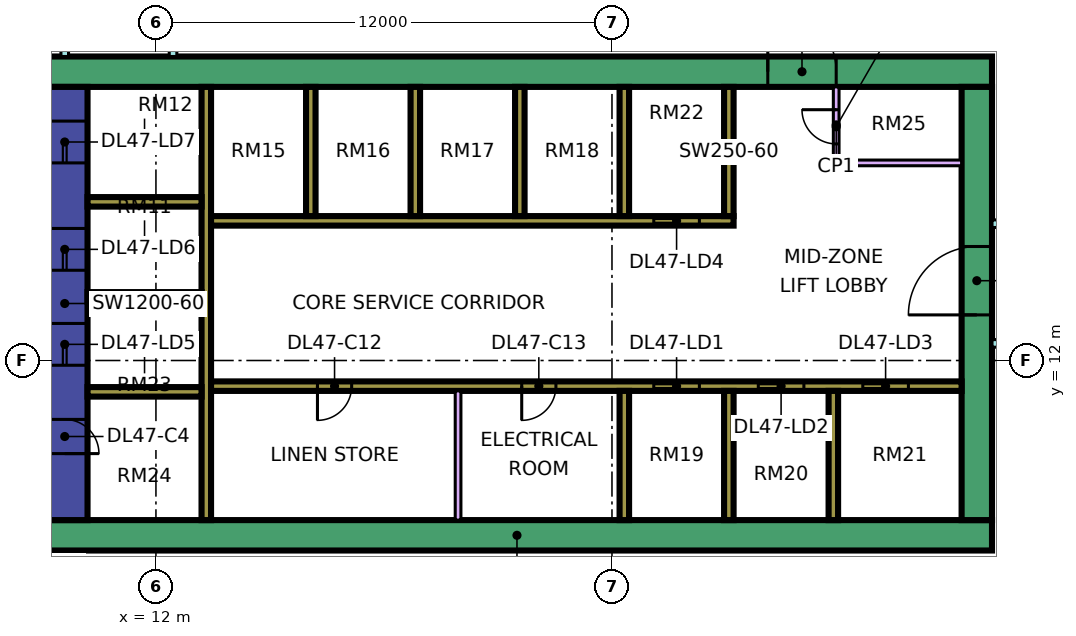
"""IFC4 building model, lengths in metres.
Left out: names, types, materials, properties, quantities, classifications, styles, units other than length and angle.
Written with IfcOpenShell. Run it as: python <this file> out.ifc"""

import sys

from ifc_helpers import new_model, si_unit, direction, frame, frame_2d, origin, place, context, subcontext, project, spatial, rectangle, extrude, element, fill, save


model = new_model("IFC4")
c1 = context("Model", 3, precision=1e-05, world=origin(), true_north=direction((0.0, 1.0)))
c2 = subcontext(c1, "Body", "Model", "MODEL_VIEW")
j1 = project(units=[si_unit("LENGTHUNIT", "METRE"), si_unit("PLANEANGLEUNIT", "RADIAN")], contexts=[c1])
p1 = place(None, origin())
s1 = spatial("IfcSite", under=j1, at=p1, CompositionType="ELEMENT")
p2 = place(p1, origin())
s2 = spatial("IfcBuilding", under=s1, at=p2, CompositionType="ELEMENT")
p3 = place(p2, frame((0.0, 0.0, 202.4)))
s3 = spatial("IfcBuildingStorey", under=s2, at=p3, CompositionType="ELEMENT", Elevation=202.4)
p4 = place(p3, frame((9.0, 7.4, 0.0), z_axis=(0.0, 0.0, 1.0), x_axis=(1.0, 0.0, 0.0)))
e1 = element("IfcWall", 1, at=p4, inside=s3, PredefinedType="SHEAR", context=c2, shape_type="SweptSolid", body=[
    extrude(rectangle(XDim=25.0, YDim=0.8, at=frame_2d((12.5, 0.0))), origin(), (0.0, 0.0, 1.0), 3.75),
])
p5 = place(p3, frame((9.0, 19.6, 0.0), z_axis=(0.0, 0.0, 1.0), x_axis=(1.0, 0.0, 0.0)))
e2 = element("IfcWall", 2, at=p5, inside=s3, PredefinedType="SHEAR", context=c2, shape_type="SweptSolid", body=[
    extrude(rectangle(XDim=25.0, YDim=0.8, at=frame_2d((12.5, 0.0))), origin(), (0.0, 0.0, 1.0), 3.75),
])
p6 = place(p5, frame((19.1, 0.0, 0.0)))
e3 = element("IfcOpeningElement", 3, at=p6, cuts=e2, PredefinedType="OPENING", context=c2, shape_type="SweptSolid", body=[
    extrude(rectangle(XDim=1.8, YDim=2.4, at=frame_2d((0.9, 1.2))), frame((0.0, 0.41, 0.0), z_axis=(0.0, -1.0, 0.0), x_axis=(1.0, 0.0, 0.0)), (0.0, 0.0, 1.0), 0.82),
])
p7 = place(p3, frame((9.6, 7.8, 0.0), z_axis=(0.0, 0.0, 1.0), x_axis=(0.0, 1.0, 0.0)))
e4 = element("IfcWall", 4, at=p7, inside=s3, PredefinedType="SHEAR", context=c2, shape_type="SweptSolid", body=[
    extrude(rectangle(XDim=11.4, YDim=1.2, at=frame_2d((5.7, 0.0))), origin(), (0.0, 0.0, 1.0), 3.75),
])
p8 = place(p7, frame((4.075, 0.0, 0.0)))
e5 = element("IfcOpeningElement", 5, at=p8, cuts=e4, PredefinedType="OPENING", context=c2, shape_type="SweptSolid", body=[
    extrude(rectangle(XDim=1.1, YDim=2.2, at=frame_2d((0.55, 1.1))), frame((0.0, 0.61, 0.0), z_axis=(0.0, -1.0, 0.0), x_axis=(1.0, 0.0, 0.0)), (0.0, 0.0, 1.0), 1.22),
])
p9 = place(p7, frame((6.575, 0.0, 0.0)))
e6 = element("IfcOpeningElement", 6, at=p9, cuts=e4, PredefinedType="OPENING", context=c2, shape_type="SweptSolid", body=[
    extrude(rectangle(XDim=1.1, YDim=2.2, at=frame_2d((0.55, 1.1))), frame((0.0, 0.61, 0.0), z_axis=(0.0, -1.0, 0.0), x_axis=(1.0, 0.0, 0.0)), (0.0, 0.0, 1.0), 1.22),
])
p10 = place(p7, frame((9.4, 0.0, 0.0)))
e7 = element("IfcOpeningElement", 7, at=p10, cuts=e4, PredefinedType="OPENING", context=c2, shape_type="SweptSolid", body=[
    extrude(rectangle(XDim=1.1, YDim=2.2, at=frame_2d((0.55, 1.1))), frame((0.0, 0.61, 0.0), z_axis=(0.0, -1.0, 0.0), x_axis=(1.0, 0.0, 0.0)), (0.0, 0.0, 1.0), 1.22),
])
p11 = place(p7, frame((1.75, 0.0, 0.0)))
e8 = element("IfcOpeningElement", 8, at=p11, cuts=e4, PredefinedType="OPENING", context=c2, shape_type="SweptSolid", body=[
    extrude(rectangle(XDim=0.9, YDim=2.1, at=frame_2d((0.45, 1.05))), frame((0.0, 0.61, 0.0), z_axis=(0.0, -1.0, 0.0), x_axis=(1.0, 0.0, 0.0)), (0.0, 0.0, 1.0), 1.22),
])
p12 = place(p3, frame((33.6, 7.8, 0.0), z_axis=(0.0, 0.0, 1.0), x_axis=(0.0, 1.0, 0.0)))
e9 = element("IfcWall", 9, at=p12, inside=s3, PredefinedType="SHEAR", context=c2, shape_type="SweptSolid", body=[
    extrude(rectangle(XDim=11.4, YDim=0.8, at=frame_2d((5.7, 0.0))), origin(), (0.0, 0.0, 1.0), 3.75),
])
p13 = place(p12, frame((5.4, 0.0, 0.0)))
e10 = element("IfcOpeningElement", 10, at=p13, cuts=e9, PredefinedType="OPENING", context=c2, shape_type="SweptSolid", body=[
    extrude(rectangle(XDim=1.8, YDim=2.4, at=frame_2d((0.9, 1.2))), frame((0.0, 0.41, 0.0), z_axis=(0.0, -1.0, 0.0), x_axis=(1.0, 0.0, 0.0)), (0.0, 0.0, 1.0), 0.82),
])
p14 = place(p3, frame((13.325, 7.8, 0.0), z_axis=(0.0, 0.0, 1.0), x_axis=(0.0, 1.0, 0.0)))
e11 = element("IfcWall", 11, at=p14, inside=s3, PredefinedType="SHEAR", context=c2, shape_type="SweptSolid", body=[
    extrude(rectangle(XDim=11.4, YDim=0.25, at=frame_2d((5.7, 0.0))), origin(), (0.0, 0.0, 1.0), 3.75),
])
p15 = place(p3, frame((13.45, 11.325, 0.0), z_axis=(0.0, 0.0, 1.0), x_axis=(1.0, 0.0, 0.0)))
e12 = element("IfcWall", 12, at=p15, inside=s3, PredefinedType="SHEAR", context=c2, shape_type="SweptSolid", body=[
    extrude(rectangle(XDim=19.75, YDim=0.25, at=frame_2d((9.875, 0.0))), origin(), (0.0, 0.0, 1.0), 3.75),
])
p16 = place(p15, frame((11.65, 0.0, 0.0)))
e13 = element("IfcOpeningElement", 13, at=p16, cuts=e12, PredefinedType="OPENING", context=c2, shape_type="SweptSolid", body=[
    extrude(rectangle(XDim=1.2, YDim=2.2, at=frame_2d((0.6, 1.1))), frame((0.0, 0.135, 0.0), z_axis=(0.0, -1.0, 0.0), x_axis=(1.0, 0.0, 0.0)), (0.0, 0.0, 1.0), 0.27),
])
p17 = place(p15, frame((14.4, 0.0, 0.0)))
e14 = element("IfcOpeningElement", 14, at=p17, cuts=e12, PredefinedType="OPENING", context=c2, shape_type="SweptSolid", body=[
    extrude(rectangle(XDim=1.2, YDim=2.2, at=frame_2d((0.6, 1.1))), frame((0.0, 0.135, 0.0), z_axis=(0.0, -1.0, 0.0), x_axis=(1.0, 0.0, 0.0)), (0.0, 0.0, 1.0), 0.27),
])
p18 = place(p15, frame((17.15, 0.0, 0.0)))
e15 = element("IfcOpeningElement", 15, at=p18, cuts=e12, PredefinedType="OPENING", context=c2, shape_type="SweptSolid", body=[
    extrude(rectangle(XDim=1.2, YDim=2.2, at=frame_2d((0.6, 1.1))), frame((0.0, 0.135, 0.0), z_axis=(0.0, -1.0, 0.0), x_axis=(1.0, 0.0, 0.0)), (0.0, 0.0, 1.0), 0.27),
])
p19 = place(p15, frame((2.8, 0.0, 0.0)))
e16 = element("IfcOpeningElement", 16, at=p19, cuts=e12, PredefinedType="OPENING", context=c2, shape_type="SweptSolid", body=[
    extrude(rectangle(XDim=0.9, YDim=2.1, at=frame_2d((0.45, 1.05))), frame((0.0, 0.135, 0.0), z_axis=(0.0, -1.0, 0.0), x_axis=(1.0, 0.0, 0.0)), (0.0, 0.0, 1.0), 0.27),
])
p20 = place(p15, frame((8.175, 0.0, 0.0)))
e17 = element("IfcOpeningElement", 17, at=p20, cuts=e12, PredefinedType="OPENING", context=c2, shape_type="SweptSolid", body=[
    extrude(rectangle(XDim=0.9, YDim=2.1, at=frame_2d((0.45, 1.05))), frame((0.0, 0.135, 0.0), z_axis=(0.0, -1.0, 0.0), x_axis=(1.0, 0.0, 0.0)), (0.0, 0.0, 1.0), 0.27),
])
p21 = place(p3, frame((13.45, 15.675, 0.0), z_axis=(0.0, 0.0, 1.0), x_axis=(1.0, 0.0, 0.0)))
e18 = element("IfcWall", 18, at=p21, inside=s3, PredefinedType="SHEAR", context=c2, shape_type="SweptSolid", body=[
    extrude(rectangle(XDim=13.75, YDim=0.25, at=frame_2d((6.875, 0.0))), origin(), (0.0, 0.0, 1.0), 3.75),
])
p22 = place(p21, frame((11.65, 0.0, 0.0)))
e19 = element("IfcOpeningElement", 19, at=p22, cuts=e18, PredefinedType="OPENING", context=c2, shape_type="SweptSolid", body=[
    extrude(rectangle(XDim=1.2, YDim=2.2, at=frame_2d((0.6, 1.1))), frame((0.0, 0.135, 0.0), z_axis=(0.0, -1.0, 0.0), x_axis=(1.0, 0.0, 0.0)), (0.0, 0.0, 1.0), 0.27),
])
for number, where, z_axis, x_axis in (
    (20, (10.2, 11.175, 0.0), (0.0, 0.0, 1.0), (1.0, 0.0, 0.0)),
    (21, (10.2, 13.675, 0.0), (0.0, 0.0, 1.0), (1.0, 0.0, 0.0)),
    (22, (10.2, 16.175, 0.0), (0.0, 0.0, 1.0), (1.0, 0.0, 0.0)),
):
    element("IfcWall", number, at=place(p3, frame(where, z_axis=z_axis, x_axis=x_axis)), inside=s3, PredefinedType="SHEAR", context=c2, shape_type="SweptSolid", body=[
        extrude(rectangle(XDim=3.0, YDim=0.25, at=frame_2d((1.5, 0.0))), origin(), (0.0, 0.0, 1.0), 3.75),
    ])
for number, where, z_axis, x_axis in (
    (23, (24.325, 7.8, 0.0), (0.0, 0.0, 1.0), (0.0, 1.0, 0.0)),
    (24, (27.075, 7.8, 0.0), (0.0, 0.0, 1.0), (0.0, 1.0, 0.0)),
    (25, (29.825, 7.8, 0.0), (0.0, 0.0, 1.0), (0.0, 1.0, 0.0)),
    (26, (16.075, 15.8, 0.0), (0.0, 0.0, 1.0), (0.0, 1.0, 0.0)),
    (27, (18.825, 15.8, 0.0), (0.0, 0.0, 1.0), (0.0, 1.0, 0.0)),
    (28, (21.575, 15.8, 0.0), (0.0, 0.0, 1.0), (0.0, 1.0, 0.0)),
    (29, (24.325, 15.8, 0.0), (0.0, 0.0, 1.0), (0.0, 1.0, 0.0)),
    (30, (27.075, 15.8, 0.0), (0.0, 0.0, 1.0), (0.0, 1.0, 0.0)),
):
    element("IfcWall", number, at=place(p3, frame(where, z_axis=z_axis, x_axis=x_axis)), inside=s3, PredefinedType="SHEAR", context=c2, shape_type="SweptSolid", body=[
        extrude(rectangle(XDim=3.4, YDim=0.25, at=frame_2d((1.7, 0.0))), origin(), (0.0, 0.0, 1.0), 3.75),
    ])
p23 = place(p3, frame((-1.447, 12.553, 0.0), z_axis=(0.0, 0.0, 1.0), x_axis=(0.707106781187, -0.707106781187, 0.0)))
e31 = element("IfcWall", 31, at=p23, inside=s3, PredefinedType="SOLIDWALL", context=c2, shape_type="SweptSolid", body=[
    extrude(rectangle(XDim=19.799, YDim=0.15, at=frame_2d((9.899, 0.0))), origin(), (0.0, 0.0, 1.0), 3.3),
])
p24 = place(p23, frame((2.212, 0.0, 0.45)))
e32 = element("IfcOpeningElement", 32, at=p24, cuts=e31, PredefinedType="OPENING", context=c2, shape_type="SweptSolid", body=[
    extrude(rectangle(XDim=3.0, YDim=2.4, at=frame_2d((1.5, 1.2))), frame((0.0, 0.085, 0.0), z_axis=(0.0, -1.0, 0.0), x_axis=(1.0, 0.0, 0.0)), (0.0, 0.0, 1.0), 0.17),
])
p25 = place(p23, frame((10.216, 0.0, 0.45)))
e33 = element("IfcOpeningElement", 33, at=p25, cuts=e31, PredefinedType="OPENING", context=c2, shape_type="SweptSolid", body=[
    extrude(rectangle(XDim=3.0, YDim=2.4, at=frame_2d((1.5, 1.2))), frame((0.0, 0.085, 0.0), z_axis=(0.0, -1.0, 0.0), x_axis=(1.0, 0.0, 0.0)), (0.0, 0.0, 1.0), 0.17),
])
p26 = place(p3, frame((19.95, 7.8, 0.0), z_axis=(0.0, 0.0, 1.0), x_axis=(0.0, 1.0, 0.0)))
e34 = element("IfcWall", 34, at=p26, inside=s3, PredefinedType="PARTITIONING", context=c2, shape_type="SweptSolid", body=[
    extrude(rectangle(XDim=3.4, YDim=0.15, at=frame_2d((1.7, 0.0))), origin(), (0.0, 0.0, 1.0), 3.3),
])
p27 = place(p3, frame((29.9, 17.2, 0.0), z_axis=(0.0, 0.0, 1.0), x_axis=(0.0, 1.0, 0.0)))
e35 = element("IfcWall", 35, at=p27, inside=s3, PredefinedType="PARTITIONING", context=c2, shape_type="SweptSolid", body=[
    extrude(rectangle(XDim=2.0, YDim=0.15, at=frame_2d((1.0, 0.0))), origin(), (0.0, 0.0, 1.0), 3.3),
])
p28 = place(p27, frame((0.5, 0.0, 0.0)))
e36 = element("IfcOpeningElement", 36, at=p28, cuts=e35, PredefinedType="OPENING", context=c2, shape_type="SweptSolid", body=[
    extrude(rectangle(XDim=0.9, YDim=2.1, at=frame_2d((0.45, 1.05))), frame((0.0, 0.085, 0.0), z_axis=(0.0, -1.0, 0.0), x_axis=(1.0, 0.0, 0.0)), (0.0, 0.0, 1.0), 0.17),
])
p29 = place(p3, frame((29.9, 17.2, 0.0), z_axis=(0.0, 0.0, 1.0), x_axis=(1.0, 0.0, 0.0)))
e37 = element("IfcWall", 37, at=p29, inside=s3, PredefinedType="PARTITIONING", context=c2, shape_type="SweptSolid", body=[
    extrude(rectangle(XDim=3.3, YDim=0.15, at=frame_2d((1.65, 0.0))), origin(), (0.0, 0.0, 1.0), 3.3),
])
p30 = place(p3, frame((9.6, 20.0, 0.0), z_axis=(0.0, 0.0, 1.0), x_axis=(0.0, 1.0, 0.0)))
e38 = element("IfcWall", 38, at=p30, inside=s3, PredefinedType="PARTITIONING", context=c2, shape_type="SweptSolid", body=[
    extrude(rectangle(XDim=44.35, YDim=0.2, at=frame_2d((22.175, 0.0))), origin(), (0.0, 0.0, 1.0), 3.3),
])
p31 = place(p30, frame((17.1, 0.0, 0.0)))
e39 = element("IfcOpeningElement", 39, at=p31, cuts=e38, PredefinedType="OPENING", context=c2, shape_type="SweptSolid", body=[
    extrude(rectangle(XDim=1.0, YDim=2.1, at=frame_2d((0.5, 1.05))), frame((0.0, 0.11, 0.0), z_axis=(0.0, -1.0, 0.0), x_axis=(1.0, 0.0, 0.0)), (0.0, 0.0, 1.0), 0.22),
])
p32 = place(p30, frame((29.1, 0.0, 0.0)))
e40 = element("IfcOpeningElement", 40, at=p32, cuts=e38, PredefinedType="OPENING", context=c2, shape_type="SweptSolid", body=[
    extrude(rectangle(XDim=1.0, YDim=2.1, at=frame_2d((0.5, 1.05))), frame((0.0, 0.11, 0.0), z_axis=(0.0, -1.0, 0.0), x_axis=(1.0, 0.0, 0.0)), (0.0, 0.0, 1.0), 0.22),
])
p33 = place(p30, frame((0.6, 0.0, 0.0)))
e41 = element("IfcOpeningElement", 41, at=p33, cuts=e38, PredefinedType="OPENING", context=c2, shape_type="SweptSolid", body=[
    extrude(rectangle(XDim=1.2, YDim=2.1, at=frame_2d((0.6, 1.05))), frame((0.0, 0.11, 0.0), z_axis=(0.0, -1.0, 0.0), x_axis=(1.0, 0.0, 0.0)), (0.0, 0.0, 1.0), 0.22),
])
p34 = place(p30, frame((4.35, 0.0, 0.0)))
e42 = element("IfcOpeningElement", 42, at=p34, cuts=e38, PredefinedType="OPENING", context=c2, shape_type="SweptSolid", body=[
    extrude(rectangle(XDim=1.0, YDim=2.1, at=frame_2d((0.5, 1.05))), frame((0.0, 0.11, 0.0), z_axis=(0.0, -1.0, 0.0), x_axis=(1.0, 0.0, 0.0)), (0.0, 0.0, 1.0), 0.22),
])
p35 = place(p3, frame((12.45, 20.0, 0.0), z_axis=(0.0, 0.0, 1.0), x_axis=(0.0, 1.0, 0.0)))
e43 = element("IfcWall", 43, at=p35, inside=s3, PredefinedType="PARTITIONING", context=c2, shape_type="SweptSolid", body=[
    extrude(rectangle(XDim=42.926, YDim=0.2, at=frame_2d((21.463, 0.0))), origin(), (0.0, 0.0, 1.0), 3.3),
])
p36 = place(p35, frame((7.15, 0.0, 0.0)))
e44 = element("IfcOpeningElement", 44, at=p36, cuts=e43, PredefinedType="OPENING", context=c2, shape_type="SweptSolid", body=[
    extrude(rectangle(XDim=1.6, YDim=2.1, at=frame_2d((0.8, 1.05))), frame((0.0, 0.11, 0.0), z_axis=(0.0, -1.0, 0.0), x_axis=(1.0, 0.0, 0.0)), (0.0, 0.0, 1.0), 0.22),
])
p37 = place(p35, frame((13.5, 0.0, 0.0)))
e45 = element("IfcOpeningElement", 45, at=p37, cuts=e43, PredefinedType="OPENING", context=c2, shape_type="SweptSolid", body=[
    extrude(rectangle(XDim=1.0, YDim=2.1, at=frame_2d((0.5, 1.05))), frame((0.0, 0.11, 0.0), z_axis=(0.0, -1.0, 0.0), x_axis=(1.0, 0.0, 0.0)), (0.0, 0.0, 1.0), 0.22),
])
p38 = place(p35, frame((17.2, 0.0, 0.0)))
e46 = element("IfcOpeningElement", 46, at=p38, cuts=e43, PredefinedType="OPENING", context=c2, shape_type="SweptSolid", body=[
    extrude(rectangle(XDim=1.0, YDim=2.1, at=frame_2d((0.5, 1.05))), frame((0.0, 0.11, 0.0), z_axis=(0.0, -1.0, 0.0), x_axis=(1.0, 0.0, 0.0)), (0.0, 0.0, 1.0), 0.22),
])
p39 = place(p35, frame((35.2, 0.0, 0.0)))
e47 = element("IfcOpeningElement", 47, at=p39, cuts=e43, PredefinedType="OPENING", context=c2, shape_type="SweptSolid", body=[
    extrude(rectangle(XDim=1.0, YDim=2.1, at=frame_2d((0.5, 1.05))), frame((0.0, 0.11, 0.0), z_axis=(0.0, -1.0, 0.0), x_axis=(1.0, 0.0, 0.0)), (0.0, 0.0, 1.0), 0.22),
])
p40 = place(p35, frame((1.15, 0.0, 0.0)))
e48 = element("IfcOpeningElement", 48, at=p40, cuts=e43, PredefinedType="OPENING", context=c2, shape_type="SweptSolid", body=[
    extrude(rectangle(XDim=1.8, YDim=2.1, at=frame_2d((0.9, 1.05))), frame((0.0, 0.11, 0.0), z_axis=(0.0, -1.0, 0.0), x_axis=(1.0, 0.0, 0.0)), (0.0, 0.0, 1.0), 0.22),
])
p41 = place(p35, frame((28.6, 0.0, 0.0)))
e49 = element("IfcOpeningElement", 49, at=p41, cuts=e43, PredefinedType="OPENING", context=c2, shape_type="SweptSolid", body=[
    extrude(rectangle(XDim=1.8, YDim=2.1, at=frame_2d((0.9, 1.05))), frame((0.0, 0.11, 0.0), z_axis=(0.0, -1.0, 0.0), x_axis=(1.0, 0.0, 0.0)), (0.0, 0.0, 1.0), 0.22),
])
p42 = place(p3, frame((34.0, 12.45, 0.0), z_axis=(0.0, 0.0, 1.0), x_axis=(1.0, 0.0, 0.0)))
e50 = element("IfcWall", 50, at=p42, inside=s3, PredefinedType="PARTITIONING", context=c2, shape_type="SweptSolid", body=[
    extrude(rectangle(XDim=2.451, YDim=0.2, at=frame_2d((1.226, 0.0))), origin(), (0.0, 0.0, 1.0), 3.3),
])
p43 = place(p3, frame((34.0, 15.6, 0.0), z_axis=(0.0, 0.0, 1.0), x_axis=(1.0, 0.0, 0.0)))
e51 = element("IfcWall", 51, at=p43, inside=s3, PredefinedType="PARTITIONING", context=c2, shape_type="SweptSolid", body=[
    extrude(rectangle(XDim=10.35, YDim=0.2, at=frame_2d((5.175, 0.0))), origin(), (0.0, 0.0, 1.0), 3.3),
])
p44 = place(p43, frame((5.6, 0.0, 0.0)))
e52 = element("IfcOpeningElement", 52, at=p44, cuts=e51, PredefinedType="OPENING", context=c2, shape_type="SweptSolid", body=[
    extrude(rectangle(XDim=1.0, YDim=2.1, at=frame_2d((0.5, 1.05))), frame((0.0, 0.11, 0.0), z_axis=(0.0, -1.0, 0.0), x_axis=(1.0, 0.0, 0.0)), (0.0, 0.0, 1.0), 0.22),
])
p45 = place(p43, frame((0.45, 0.0, 0.0)))
e53 = element("IfcOpeningElement", 53, at=p45, cuts=e51, PredefinedType="OPENING", context=c2, shape_type="SweptSolid", body=[
    extrude(rectangle(XDim=1.2, YDim=2.1, at=frame_2d((0.6, 1.05))), frame((0.0, 0.11, 0.0), z_axis=(0.0, -1.0, 0.0), x_axis=(1.0, 0.0, 0.0)), (0.0, 0.0, 1.0), 0.22),
])
p46 = place(p16, origin())
e54 = element("IfcDoor", 54, at=p46, inside=s3, OperationType="DOUBLE_DOOR_SLIDING", PredefinedType="DOOR", context=c2, shape_type="SweptSolid", body=[
    extrude(rectangle(XDim=1.2, YDim=2.2, at=frame_2d((0.6, 1.1))), frame((0.0, 0.025, 0.0), z_axis=(0.0, -1.0, 0.0), x_axis=(1.0, 0.0, 0.0)), (0.0, 0.0, 1.0), 0.05),
])
fill(e13, e54)
p47 = place(p17, origin())
e55 = element("IfcDoor", 55, at=p47, inside=s3, OperationType="DOUBLE_DOOR_SLIDING", PredefinedType="DOOR", context=c2, shape_type="SweptSolid", body=[
    extrude(rectangle(XDim=1.2, YDim=2.2, at=frame_2d((0.6, 1.1))), frame((0.0, 0.025, 0.0), z_axis=(0.0, -1.0, 0.0), x_axis=(1.0, 0.0, 0.0)), (0.0, 0.0, 1.0), 0.05),
])
fill(e14, e55)
p48 = place(p18, origin())
e56 = element("IfcDoor", 56, at=p48, inside=s3, OperationType="DOUBLE_DOOR_SLIDING", PredefinedType="DOOR", context=c2, shape_type="SweptSolid", body=[
    extrude(rectangle(XDim=1.2, YDim=2.2, at=frame_2d((0.6, 1.1))), frame((0.0, 0.025, 0.0), z_axis=(0.0, -1.0, 0.0), x_axis=(1.0, 0.0, 0.0)), (0.0, 0.0, 1.0), 0.05),
])
fill(e15, e56)
p49 = place(p22, origin())
e57 = element("IfcDoor", 57, at=p49, inside=s3, OperationType="DOUBLE_DOOR_SLIDING", PredefinedType="DOOR", context=c2, shape_type="SweptSolid", body=[
    extrude(rectangle(XDim=1.2, YDim=2.2, at=frame_2d((0.6, 1.1))), frame((0.0, 0.025, 0.0), z_axis=(0.0, -1.0, 0.0), x_axis=(1.0, 0.0, 0.0)), (0.0, 0.0, 1.0), 0.05),
])
fill(e19, e57)
p50 = place(p8, origin())
e58 = element("IfcDoor", 58, at=p50, inside=s3, OperationType="DOUBLE_DOOR_SLIDING", PredefinedType="DOOR", context=c2, shape_type="SweptSolid", body=[
    extrude(rectangle(XDim=1.1, YDim=2.2, at=frame_2d((0.55, 1.1))), frame((0.0, 0.025, 0.0), z_axis=(0.0, -1.0, 0.0), x_axis=(1.0, 0.0, 0.0)), (0.0, 0.0, 1.0), 0.05),
])
fill(e5, e58)
p51 = place(p9, origin())
e59 = element("IfcDoor", 59, at=p51, inside=s3, OperationType="DOUBLE_DOOR_SLIDING", PredefinedType="DOOR", context=c2, shape_type="SweptSolid", body=[
    extrude(rectangle(XDim=1.1, YDim=2.2, at=frame_2d((0.55, 1.1))), frame((0.0, 0.025, 0.0), z_axis=(0.0, -1.0, 0.0), x_axis=(1.0, 0.0, 0.0)), (0.0, 0.0, 1.0), 0.05),
])
fill(e6, e59)
p52 = place(p10, origin())
e60 = element("IfcDoor", 60, at=p52, inside=s3, OperationType="DOUBLE_DOOR_SLIDING", PredefinedType="DOOR", context=c2, shape_type="SweptSolid", body=[
    extrude(rectangle(XDim=1.1, YDim=2.2, at=frame_2d((0.55, 1.1))), frame((0.0, 0.025, 0.0), z_axis=(0.0, -1.0, 0.0), x_axis=(1.0, 0.0, 0.0)), (0.0, 0.0, 1.0), 0.05),
])
fill(e7, e60)
p53 = place(p13, origin())
e61 = element("IfcDoor", 61, at=p53, inside=s3, OperationType="DOUBLE_DOOR_SINGLE_SWING", PredefinedType="DOOR", context=c2, shape_type="SweptSolid", body=[
    extrude(rectangle(XDim=1.8, YDim=2.4, at=frame_2d((0.9, 1.2))), frame((0.0, 0.025, 0.0), z_axis=(0.0, -1.0, 0.0), x_axis=(1.0, 0.0, 0.0)), (0.0, 0.0, 1.0), 0.05),
])
fill(e10, e61)
p54 = place(p6, origin())
e62 = element("IfcDoor", 62, at=p54, inside=s3, OperationType="DOUBLE_DOOR_SINGLE_SWING", PredefinedType="DOOR", context=c2, shape_type="SweptSolid", body=[
    extrude(rectangle(XDim=1.8, YDim=2.4, at=frame_2d((0.9, 1.2))), frame((0.0, 0.025, 0.0), z_axis=(0.0, -1.0, 0.0), x_axis=(1.0, 0.0, 0.0)), (0.0, 0.0, 1.0), 0.05),
])
fill(e3, e62)
p55 = place(p11, frame((0.9, 0.0, 0.0), z_axis=(0.0, 0.0, 1.0), x_axis=(-1.0, 0.0, 0.0)))
e63 = element("IfcDoor", 63, at=p55, inside=s3, OperationType="SINGLE_SWING_LEFT", PredefinedType="DOOR", context=c2, shape_type="SweptSolid", body=[
    extrude(rectangle(XDim=0.9, YDim=2.1, at=frame_2d((0.45, 1.05))), frame((0.0, 0.025, 0.0), z_axis=(0.0, -1.0, 0.0), x_axis=(1.0, 0.0, 0.0)), (0.0, 0.0, 1.0), 0.05),
])
fill(e8, e63)
p56 = place(p19, frame((0.9, 0.0, 0.0), z_axis=(0.0, 0.0, 1.0), x_axis=(-1.0, 0.0, 0.0)))
e64 = element("IfcDoor", 64, at=p56, inside=s3, OperationType="SINGLE_SWING_LEFT", PredefinedType="DOOR", context=c2, shape_type="SweptSolid", body=[
    extrude(rectangle(XDim=0.9, YDim=2.1, at=frame_2d((0.45, 1.05))), frame((0.0, 0.025, 0.0), z_axis=(0.0, -1.0, 0.0), x_axis=(1.0, 0.0, 0.0)), (0.0, 0.0, 1.0), 0.05),
])
fill(e16, e64)
p57 = place(p20, frame((0.9, 0.0, 0.0), z_axis=(0.0, 0.0, 1.0), x_axis=(-1.0, 0.0, 0.0)))
e65 = element("IfcDoor", 65, at=p57, inside=s3, OperationType="SINGLE_SWING_LEFT", PredefinedType="DOOR", context=c2, shape_type="SweptSolid", body=[
    extrude(rectangle(XDim=0.9, YDim=2.1, at=frame_2d((0.45, 1.05))), frame((0.0, 0.025, 0.0), z_axis=(0.0, -1.0, 0.0), x_axis=(1.0, 0.0, 0.0)), (0.0, 0.0, 1.0), 0.05),
])
fill(e17, e65)
p58 = place(p28, frame((0.9, 0.0, 0.0), z_axis=(0.0, 0.0, 1.0), x_axis=(-1.0, 0.0, 0.0)))
e66 = element("IfcDoor", 66, at=p58, inside=s3, OperationType="SINGLE_SWING_RIGHT", PredefinedType="DOOR", context=c2, shape_type="SweptSolid", body=[
    extrude(rectangle(XDim=0.9, YDim=2.1, at=frame_2d((0.45, 1.05))), frame((0.0, 0.025, 0.0), z_axis=(0.0, -1.0, 0.0), x_axis=(1.0, 0.0, 0.0)), (0.0, 0.0, 1.0), 0.05),
])
fill(e36, e66)
save(model, sys.argv[1])
